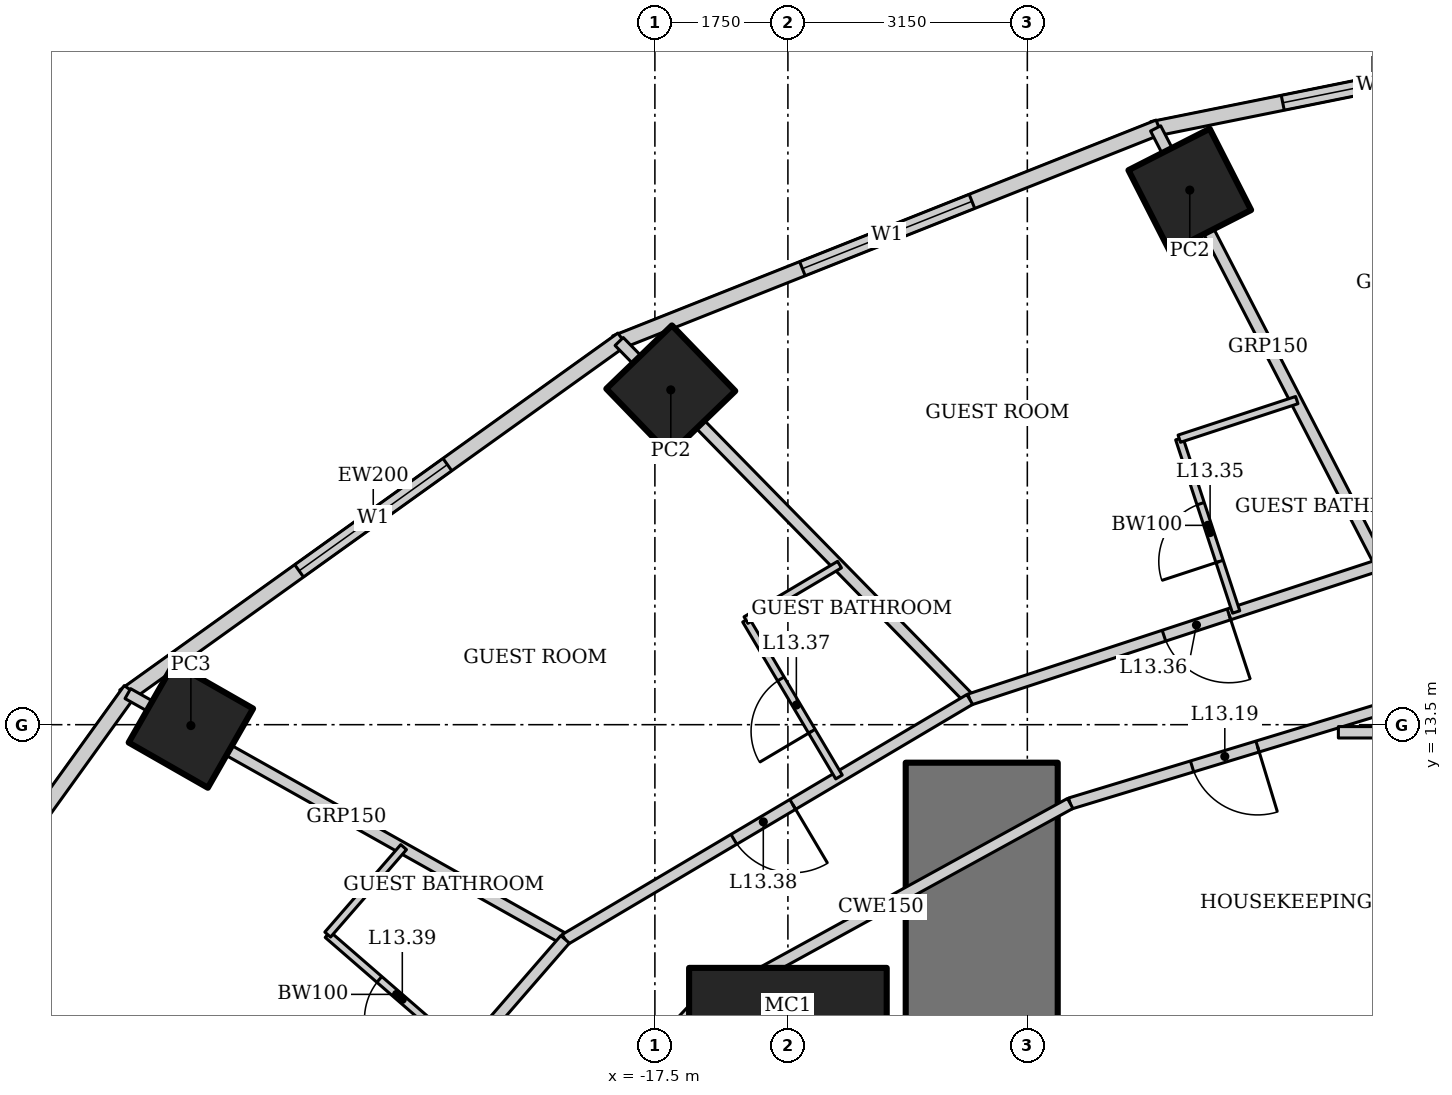
"""IFC4 building model, lengths in metres.
Left out: names, types, materials, properties, quantities, classifications, styles, units other than length and angle.
Written with IfcOpenShell. Run it as: python <this file> out.ifc"""

import sys

from ifc_helpers import new_model, si_unit, direction, frame, frame_2d, origin, origin_2d, place, context, subcontext, project, spatial, rectangle, hollow_rectangle, extrude, element, fill, save


model = new_model("IFC4")
c1 = context("Model", 3, precision=1e-05, world=origin(), true_north=direction((0.0, 1.0)))
c2 = subcontext(c1, "Body", "Model", "MODEL_VIEW")
j1 = project(units=[si_unit("LENGTHUNIT", "METRE"), si_unit("PLANEANGLEUNIT", "RADIAN")], contexts=[c1])
p1 = place(None, origin())
s1 = spatial("IfcSite", under=j1, at=p1, CompositionType="ELEMENT")
p2 = place(p1, origin())
s2 = spatial("IfcBuilding", under=s1, at=p2, CompositionType="ELEMENT")
p3 = place(p2, frame((0.0, 0.0, 62.2)))
s3 = spatial("IfcBuildingStorey", under=s2, at=p3, CompositionType="ELEMENT", Elevation=62.2)
p4 = place(p3, frame((-15.75, 9.0, 0.0), z_axis=(0.0, 0.0, 1.0), x_axis=(1.0, 0.0, 0.0)))
e1 = element("IfcColumn", 1, at=p4, inside=s3, PredefinedType="COLUMN", context=c2, shape_type="SweptSolid", body=[
    extrude(hollow_rectangle(XDim=2.6, YDim=2.6, WallThickness=0.13, at=origin_2d()), origin(), (0.0, 0.0, 1.0), 3.6),
])
for number, where, z_axis, x_axis in (
    (2, (-10.463, 20.534, 0.0), (0.0, 0.0, 1.0), (0.891, 0.454, 0.0)),
    (3, (-17.291, 17.905, 0.0), (0.0, 0.0, 1.0), (0.719, 0.695, 0.0)),
):
    element("IfcColumn", number, at=place(p3, frame(where, z_axis=z_axis, x_axis=x_axis)), inside=s3, PredefinedType="COLUMN", context=c2, shape_type="SweptSolid", body=[
        extrude(hollow_rectangle(XDim=1.2, YDim=1.2, WallThickness=0.1, at=origin_2d()), origin(), (0.0, 0.0, 1.0), 3.6),
    ])
p5 = place(p3, frame((-23.605, 13.489, 0.0), z_axis=(0.0, 0.0, 1.0), x_axis=(0.496139221777, 0.86824298017, 0.0)))
e4 = element("IfcColumn", 4, at=p5, inside=s3, PredefinedType="COLUMN", context=c2, shape_type="SweptSolid", body=[
    extrude(hollow_rectangle(XDim=1.2, YDim=1.2, WallThickness=0.12, at=origin_2d()), origin(), (0.0, 0.0, 1.0), 3.6),
])
p6 = place(p3, frame((-13.2, 13.0, 0.0), z_axis=(0.0, 0.0, 1.0), x_axis=(0.0, -1.0, 0.0)))
e5 = element("IfcWall", 5, at=p6, inside=s3, PredefinedType="SHEAR", context=c2, shape_type="SweptSolid", body=[
    extrude(rectangle(XDim=26.0, YDim=2.0, at=frame_2d((13.0, 0.0))), origin(), (0.0, 0.0, 1.0), 3.6),
])
p7 = place(p6, frame((12.1, 0.0, 0.0)))
e6 = element("IfcOpeningElement", 6, at=p7, cuts=e5, PredefinedType="OPENING", context=c2, shape_type="SweptSolid", body=[
    extrude(rectangle(XDim=1.8, YDim=2.1, at=frame_2d((0.9, 1.05))), frame((0.0, 1.01, 0.0), z_axis=(0.0, -1.0, 0.0), x_axis=(1.0, 0.0, 0.0)), (0.0, 0.0, 1.0), 2.02),
])
p8 = place(p3, frame((-5.17, 22.504, 0.0), z_axis=(0.0, 0.0, 1.0), x_axis=(-0.980251657452, -0.197754110105, 0.0)))
e7 = element("IfcWall", 7, at=p8, inside=s3, PredefinedType="SOLIDWALL", context=c2, shape_type="SweptSolid", body=[
    extrude(rectangle(XDim=5.904, YDim=0.2, at=frame_2d((2.952, 0.0))), origin(), (0.0, 0.0, 1.0), 3.45),
])
p9 = place(p8, frame((1.752, 0.0, 0.5)))
e8 = element("IfcOpeningElement", 8, at=p9, cuts=e7, PredefinedType="OPENING", context=c2, shape_type="SweptSolid", body=[
    extrude(rectangle(XDim=2.4, YDim=2.2, at=frame_2d((1.2, 1.1))), frame((0.0, 0.11, 0.0), z_axis=(0.0, -1.0, 0.0), x_axis=(1.0, 0.0, 0.0)), (0.0, 0.0, 1.0), 0.22),
])
p10 = place(p3, frame((-10.869, 21.363, 0.0), z_axis=(0.0, 0.0, 1.0), x_axis=(-0.929358351251, -0.369178892895, 0.0)))
e9 = element("IfcWall", 9, at=p10, inside=s3, PredefinedType="SOLIDWALL", context=c2, shape_type="SweptSolid", body=[
    extrude(rectangle(XDim=7.692, YDim=0.2, at=frame_2d((3.846, 0.0))), origin(), (0.0, 0.0, 1.0), 3.45),
])
p11 = place(p10, frame((2.646, 0.0, 0.5)))
e10 = element("IfcOpeningElement", 10, at=p11, cuts=e9, PredefinedType="OPENING", context=c2, shape_type="SweptSolid", body=[
    extrude(rectangle(XDim=2.4, YDim=2.2, at=frame_2d((1.2, 1.1))), frame((0.0, 0.11, 0.0), z_axis=(0.0, -1.0, 0.0), x_axis=(1.0, 0.0, 0.0)), (0.0, 0.0, 1.0), 0.22),
])
p12 = place(p3, frame((-17.929, 18.572, 0.0), z_axis=(0.0, 0.0, 1.0), x_axis=(-0.812791321576, -0.582554948112, 0.0)))
e11 = element("IfcWall", 11, at=p12, inside=s3, PredefinedType="SOLIDWALL", context=c2, shape_type="SweptSolid", body=[
    extrude(rectangle(XDim=8.063, YDim=0.2, at=frame_2d((4.032, 0.0))), origin(), (0.0, 0.0, 1.0), 3.45),
])
p13 = place(p12, frame((2.832, 0.0, 0.5)))
e12 = element("IfcOpeningElement", 12, at=p13, cuts=e11, PredefinedType="OPENING", context=c2, shape_type="SweptSolid", body=[
    extrude(rectangle(XDim=2.4, YDim=2.2, at=frame_2d((1.2, 1.1))), frame((0.0, 0.11, 0.0), z_axis=(0.0, -1.0, 0.0), x_axis=(1.0, 0.0, 0.0)), (0.0, 0.0, 1.0), 0.22),
])
p14 = place(p3, frame((-24.4, 13.957, 0.0), z_axis=(0.0, 0.0, 1.0), x_axis=(-0.583937613703, -0.811798536155, 0.0)))
e13 = element("IfcWall", 13, at=p14, inside=s3, PredefinedType="SOLIDWALL", context=c2, shape_type="SweptSolid", body=[
    extrude(rectangle(XDim=8.323, YDim=0.2, at=frame_2d((4.162, 0.0))), origin(), (0.0, 0.0, 1.0), 3.45),
])
p15 = place(p14, frame((2.961, 0.0, 0.5)))
e14 = element("IfcOpeningElement", 14, at=p15, cuts=e13, PredefinedType="OPENING", context=c2, shape_type="SweptSolid", body=[
    extrude(rectangle(XDim=2.4, YDim=2.2, at=frame_2d((1.2, 1.1))), frame((0.0, 0.11, 0.0), z_axis=(0.0, -1.0, 0.0), x_axis=(1.0, 0.0, 0.0)), (0.0, 0.0, 1.0), 0.22),
])
p16 = place(p3, frame((-10.912, 21.346, 0.0), z_axis=(0.0, 0.0, 1.0), x_axis=(0.458384799126, -0.888753833145, 0.0)))
e15 = element("IfcWall", 15, at=p16, inside=s3, PredefinedType="PARTITIONING", context=c2, shape_type="SweptSolid", body=[
    extrude(rectangle(XDim=6.457, YDim=0.15, at=frame_2d((3.229, 0.0))), origin(), (0.0, 0.0, 1.0), 2.528),
])
p17 = place(p3, frame((-17.97, 18.542, 0.0), z_axis=(0.0, 0.0, 1.0), x_axis=(0.699736251994, -0.714401272147, 0.0)))
e16 = element("IfcWall", 16, at=p17, inside=s3, PredefinedType="PARTITIONING", context=c2, shape_type="SweptSolid", body=[
    extrude(rectangle(XDim=6.593, YDim=0.15, at=frame_2d((3.296, 0.0))), origin(), (0.0, 0.0, 1.0), 2.528),
])
p18 = place(p3, frame((-24.435, 13.909, 0.0), z_axis=(0.0, 0.0, 1.0), x_axis=(0.871747379892, -0.489955616001, 0.0)))
e17 = element("IfcWall", 17, at=p18, inside=s3, PredefinedType="PARTITIONING", context=c2, shape_type="SweptSolid", body=[
    extrude(rectangle(XDim=6.6, YDim=0.15, at=frame_2d((3.3, 0.0))), origin(), (0.0, 0.0, 1.0), 2.693),
])
p19 = place(p3, frame((-7.952, 15.607, 0.0), z_axis=(0.0, 0.0, 1.0), x_axis=(-0.950106803111, -0.311924770869, 0.0)))
e18 = element("IfcWall", 18, at=p19, inside=s3, PredefinedType="PARTITIONING", context=c2, shape_type="SweptSolid", body=[
    extrude(rectangle(XDim=5.689, YDim=0.15, at=frame_2d((2.845, 0.0))), origin(), (0.0, 0.0, 1.0), 3.45),
])
p20 = place(p19, frame((2.1, 0.0, 0.0)))
e19 = element("IfcOpeningElement", 19, at=p20, cuts=e18, PredefinedType="OPENING", context=c2, shape_type="SweptSolid", body=[
    extrude(rectangle(XDim=0.9, YDim=2.1, at=frame_2d((0.45, 1.05))), frame((0.0, 0.085, 0.0), z_axis=(0.0, -1.0, 0.0), x_axis=(1.0, 0.0, 0.0)), (0.0, 0.0, 1.0), 0.17),
])
p21 = place(p3, frame((-13.357, 13.832, 0.0), z_axis=(0.0, 0.0, 1.0), x_axis=(-0.860147339762, -0.510045639036, 0.0)))
e20 = element("IfcWall", 20, at=p21, inside=s3, PredefinedType="PARTITIONING", context=c2, shape_type="SweptSolid", body=[
    extrude(rectangle(XDim=6.19, YDim=0.15, at=frame_2d((3.095, 0.0))), origin(), (0.0, 0.0, 1.0), 3.45),
])
p22 = place(p21, frame((2.708, 0.0, 0.0)))
e21 = element("IfcOpeningElement", 21, at=p22, cuts=e20, PredefinedType="OPENING", context=c2, shape_type="SweptSolid", body=[
    extrude(rectangle(XDim=0.9, YDim=2.1, at=frame_2d((0.45, 1.05))), frame((0.0, 0.085, 0.0), z_axis=(0.0, -1.0, 0.0), x_axis=(1.0, 0.0, 0.0)), (0.0, 0.0, 1.0), 0.17),
])
p23 = place(p3, frame((-18.681, 10.675, 0.0), z_axis=(0.0, 0.0, 1.0), x_axis=(-0.655599989166, -0.755108372491, 0.0)))
e22 = element("IfcWall", 22, at=p23, inside=s3, PredefinedType="PARTITIONING", context=c2, shape_type="SweptSolid", body=[
    extrude(rectangle(XDim=6.551, YDim=0.15, at=frame_2d((3.275, 0.0))), origin(), (0.0, 0.0, 1.0), 3.45),
])
p24 = place(p23, frame((5.301, 0.0, 0.0)))
e23 = element("IfcOpeningElement", 23, at=p24, cuts=e22, PredefinedType="OPENING", context=c2, shape_type="SweptSolid", body=[
    extrude(rectangle(XDim=0.9, YDim=2.1, at=frame_2d((0.45, 1.05))), frame((0.0, 0.085, 0.0), z_axis=(0.0, -1.0, 0.0), x_axis=(1.0, 0.0, 0.0)), (0.0, 0.0, 1.0), 0.17),
])
p25 = place(p3, frame((-7.113, 13.96, 0.0), z_axis=(0.0, 0.0, 1.0), x_axis=(-0.956795045135, -0.290763205385, 0.0)))
e24 = element("IfcWall", 24, at=p25, inside=s3, PredefinedType="PARTITIONING", context=c2, shape_type="SweptSolid", body=[
    extrude(rectangle(XDim=5.146, YDim=0.15, at=frame_2d((2.573, 0.0))), origin(), (0.0, 0.0, 1.0), 3.45),
])
p26 = place(p25, frame((2.569, 0.0, 0.0)))
e25 = element("IfcOpeningElement", 25, at=p26, cuts=e24, PredefinedType="OPENING", context=c2, shape_type="SweptSolid", body=[
    extrude(rectangle(XDim=0.9, YDim=2.1, at=frame_2d((0.45, 1.05))), frame((0.0, 0.085, 0.0), z_axis=(0.0, -1.0, 0.0), x_axis=(1.0, 0.0, 0.0)), (0.0, 0.0, 1.0), 0.17),
])
p27 = place(p3, frame((-12.036, 12.464, 0.0), z_axis=(0.0, 0.0, 1.0), x_axis=(-0.876522084062, -0.481361647986, 0.0)))
e26 = element("IfcWall", 26, at=p27, inside=s3, PredefinedType="PARTITIONING", context=c2, shape_type="SweptSolid", body=[
    extrude(rectangle(XDim=5.687, YDim=0.15, at=frame_2d((2.844, 0.0))), origin(), (0.0, 0.0, 1.0), 3.45),
])
p28 = place(p3, frame((-17.021, 9.726, 0.0), z_axis=(0.0, 0.0, 1.0), x_axis=(-0.68365836236, -0.729802194828, 0.0)))
e27 = element("IfcWall", 27, at=p28, inside=s3, PredefinedType="PARTITIONING", context=c2, shape_type="SweptSolid", body=[
    extrude(rectangle(XDim=6.09, YDim=0.15, at=frame_2d((3.045, 0.0))), origin(), (0.0, 0.0, 1.0), 3.45),
])
p29 = place(p28, frame((2.545, 0.0, 0.0)))
e28 = element("IfcOpeningElement", 28, at=p29, cuts=e27, PredefinedType="OPENING", context=c2, shape_type="SweptSolid", body=[
    extrude(rectangle(XDim=1.0, YDim=2.1, at=frame_2d((0.5, 1.05))), frame((0.0, 0.085, 0.0), z_axis=(0.0, -1.0, 0.0), x_axis=(1.0, 0.0, 0.0)), (0.0, 0.0, 1.0), 0.17),
])
p30 = place(p3, frame((-4.56, 13.4, 0.0), z_axis=(0.0, 0.0, 1.0), x_axis=(-1.0, 0.0, 0.0)))
e29 = element("IfcWall", 29, at=p30, inside=s3, PredefinedType="PARTITIONING", context=c2, shape_type="SweptSolid", body=[
    extrude(rectangle(XDim=3.948, YDim=0.15, at=frame_2d((1.974, 0.0))), origin(), (0.0, 0.0, 1.0), 3.45),
])
p31 = place(p3, frame((-9.852, 14.983, 0.0), z_axis=(0.0, 0.0, 1.0), x_axis=(-0.311890952591, 0.950117905153, 0.0)))
e30 = element("IfcWall", 30, at=p31, inside=s3, PredefinedType="PARTITIONING", context=c2, shape_type="SweptSolid", body=[
    extrude(rectangle(XDim=2.4, YDim=0.1, at=frame_2d((1.2, 0.0))), origin(), (0.0, 0.0, 1.0), 3.45),
])
p32 = place(p31, frame((0.7, 0.0, 0.0)))
e31 = element("IfcOpeningElement", 31, at=p32, cuts=e30, PredefinedType="OPENING", context=c2, shape_type="SweptSolid", body=[
    extrude(rectangle(XDim=0.8, YDim=2.1, at=frame_2d((0.4, 1.05))), frame((0.0, 0.06, 0.0), z_axis=(0.0, -1.0, 0.0), x_axis=(1.0, 0.0, 0.0)), (0.0, 0.0, 1.0), 0.12),
])
p33 = place(p3, frame((-10.601, 17.263, 0.0), z_axis=(0.0, 0.0, 1.0), x_axis=(0.950113706819, 0.311903741746, 0.0)))
e32 = element("IfcWall", 32, at=p33, inside=s3, PredefinedType="PARTITIONING", context=c2, shape_type="SweptSolid", body=[
    extrude(rectangle(XDim=1.627, YDim=0.1, at=frame_2d((0.814, 0.0))), origin(), (0.0, 0.0, 1.0), 3.45),
])
p34 = place(p3, frame((-15.078, 12.812, 0.0), z_axis=(0.0, 0.0, 1.0), x_axis=(-0.510075642074, 0.860129548012, 0.0)))
e33 = element("IfcWall", 33, at=p34, inside=s3, PredefinedType="PARTITIONING", context=c2, shape_type="SweptSolid", body=[
    extrude(rectangle(XDim=2.4, YDim=0.1, at=frame_2d((1.2, 0.0))), origin(), (0.0, 0.0, 1.0), 3.45),
])
p35 = place(p34, frame((0.7, 0.0, 0.0)))
e34 = element("IfcOpeningElement", 34, at=p35, cuts=e33, PredefinedType="OPENING", context=c2, shape_type="SweptSolid", body=[
    extrude(rectangle(XDim=0.8, YDim=2.1, at=frame_2d((0.4, 1.05))), frame((0.0, 0.06, 0.0), z_axis=(0.0, -1.0, 0.0), x_axis=(1.0, 0.0, 0.0)), (0.0, 0.0, 1.0), 0.12),
])
p36 = place(p3, frame((-16.302, 14.876, 0.0), z_axis=(0.0, 0.0, 1.0), x_axis=(0.8601307696, 0.510073582131, 0.0)))
e35 = element("IfcWall", 35, at=p36, inside=s3, PredefinedType="PARTITIONING", context=c2, shape_type="SweptSolid", body=[
    extrude(rectangle(XDim=1.431, YDim=0.1, at=frame_2d((0.716, 0.0))), origin(), (0.0, 0.0, 1.0), 3.45),
])
p37 = place(p3, frame((-19.993, 9.165, 0.0), z_axis=(0.0, 0.0, 1.0), x_axis=(-0.755098052661, 0.655611875172, 0.0)))
e36 = element("IfcWall", 36, at=p37, inside=s3, PredefinedType="PARTITIONING", context=c2, shape_type="SweptSolid", body=[
    extrude(rectangle(XDim=2.4, YDim=0.1, at=frame_2d((1.2, 0.0))), origin(), (0.0, 0.0, 1.0), 3.45),
])
p38 = place(p37, frame((0.7, 0.0, 0.0)))
e37 = element("IfcOpeningElement", 37, at=p38, cuts=e36, PredefinedType="OPENING", context=c2, shape_type="SweptSolid", body=[
    extrude(rectangle(XDim=0.8, YDim=2.1, at=frame_2d((0.4, 1.05))), frame((0.0, 0.06, 0.0), z_axis=(0.0, -1.0, 0.0), x_axis=(1.0, 0.0, 0.0)), (0.0, 0.0, 1.0), 0.12),
])
p39 = place(p3, frame((-21.805, 10.738, 0.0), z_axis=(0.0, 0.0, 1.0), x_axis=(0.655528024617, 0.755170847518, 0.0)))
e38 = element("IfcWall", 38, at=p39, inside=s3, PredefinedType="PARTITIONING", context=c2, shape_type="SweptSolid", body=[
    extrude(rectangle(XDim=1.524, YDim=0.1, at=frame_2d((0.762, 0.0))), origin(), (0.0, 0.0, 1.0), 3.45),
])
p40 = place(p9, origin())
e39 = element("IfcWindow", 39, at=p40, inside=s3, PartitioningType="SINGLE_PANEL", PredefinedType="WINDOW", context=c2, shape_type="SweptSolid", body=[
    extrude(rectangle(XDim=2.4, YDim=2.2, at=frame_2d((1.2, 1.1))), frame((0.0, 0.03, 0.0), z_axis=(0.0, -1.0, 0.0), x_axis=(1.0, 0.0, 0.0)), (0.0, 0.0, 1.0), 0.06),
])
fill(e8, e39)
p41 = place(p11, origin())
e40 = element("IfcWindow", 40, at=p41, inside=s3, PartitioningType="SINGLE_PANEL", PredefinedType="WINDOW", context=c2, shape_type="SweptSolid", body=[
    extrude(rectangle(XDim=2.4, YDim=2.2, at=frame_2d((1.2, 1.1))), frame((0.0, 0.03, 0.0), z_axis=(0.0, -1.0, 0.0), x_axis=(1.0, 0.0, 0.0)), (0.0, 0.0, 1.0), 0.06),
])
fill(e10, e40)
p42 = place(p13, origin())
e41 = element("IfcWindow", 41, at=p42, inside=s3, PartitioningType="SINGLE_PANEL", PredefinedType="WINDOW", context=c2, shape_type="SweptSolid", body=[
    extrude(rectangle(XDim=2.4, YDim=2.2, at=frame_2d((1.2, 1.1))), frame((0.0, 0.03, 0.0), z_axis=(0.0, -1.0, 0.0), x_axis=(1.0, 0.0, 0.0)), (0.0, 0.0, 1.0), 0.06),
])
fill(e12, e41)
p43 = place(p26, origin())
e42 = element("IfcDoor", 42, at=p43, inside=s3, OperationType="SINGLE_SWING_LEFT", PredefinedType="DOOR", context=c2, shape_type="SweptSolid", body=[
    extrude(rectangle(XDim=0.9, YDim=2.1, at=frame_2d((0.45, 1.05))), frame((0.0, 0.025, 0.0), z_axis=(0.0, -1.0, 0.0), x_axis=(1.0, 0.0, 0.0)), (0.0, 0.0, 1.0), 0.05),
])
fill(e25, e42)
p44 = place(p32, origin())
e43 = element("IfcDoor", 43, at=p44, inside=s3, OperationType="SINGLE_SWING_LEFT", PredefinedType="DOOR", context=c2, shape_type="SweptSolid", body=[
    extrude(rectangle(XDim=0.8, YDim=2.1, at=frame_2d((0.4, 1.05))), frame((0.0, 0.025, 0.0), z_axis=(0.0, -1.0, 0.0), x_axis=(1.0, 0.0, 0.0)), (0.0, 0.0, 1.0), 0.05),
])
fill(e31, e43)
p45 = place(p20, origin())
e44 = element("IfcDoor", 44, at=p45, inside=s3, OperationType="SINGLE_SWING_LEFT", PredefinedType="DOOR", context=c2, shape_type="SweptSolid", body=[
    extrude(rectangle(XDim=0.9, YDim=2.1, at=frame_2d((0.45, 1.05))), frame((0.0, 0.025, 0.0), z_axis=(0.0, -1.0, 0.0), x_axis=(1.0, 0.0, 0.0)), (0.0, 0.0, 1.0), 0.05),
])
fill(e19, e44)
p46 = place(p35, origin())
e45 = element("IfcDoor", 45, at=p46, inside=s3, OperationType="SINGLE_SWING_LEFT", PredefinedType="DOOR", context=c2, shape_type="SweptSolid", body=[
    extrude(rectangle(XDim=0.8, YDim=2.1, at=frame_2d((0.4, 1.05))), frame((0.0, 0.025, 0.0), z_axis=(0.0, -1.0, 0.0), x_axis=(1.0, 0.0, 0.0)), (0.0, 0.0, 1.0), 0.05),
])
fill(e34, e45)
p47 = place(p22, origin())
e46 = element("IfcDoor", 46, at=p47, inside=s3, OperationType="SINGLE_SWING_LEFT", PredefinedType="DOOR", context=c2, shape_type="SweptSolid", body=[
    extrude(rectangle(XDim=0.9, YDim=2.1, at=frame_2d((0.45, 1.05))), frame((0.0, 0.025, 0.0), z_axis=(0.0, -1.0, 0.0), x_axis=(1.0, 0.0, 0.0)), (0.0, 0.0, 1.0), 0.05),
])
fill(e21, e46)
p48 = place(p38, origin())
e47 = element("IfcDoor", 47, at=p48, inside=s3, OperationType="SINGLE_SWING_LEFT", PredefinedType="DOOR", context=c2, shape_type="SweptSolid", body=[
    extrude(rectangle(XDim=0.8, YDim=2.1, at=frame_2d((0.4, 1.05))), frame((0.0, 0.025, 0.0), z_axis=(0.0, -1.0, 0.0), x_axis=(1.0, 0.0, 0.0)), (0.0, 0.0, 1.0), 0.05),
])
fill(e37, e47)
save(model, sys.argv[1])
